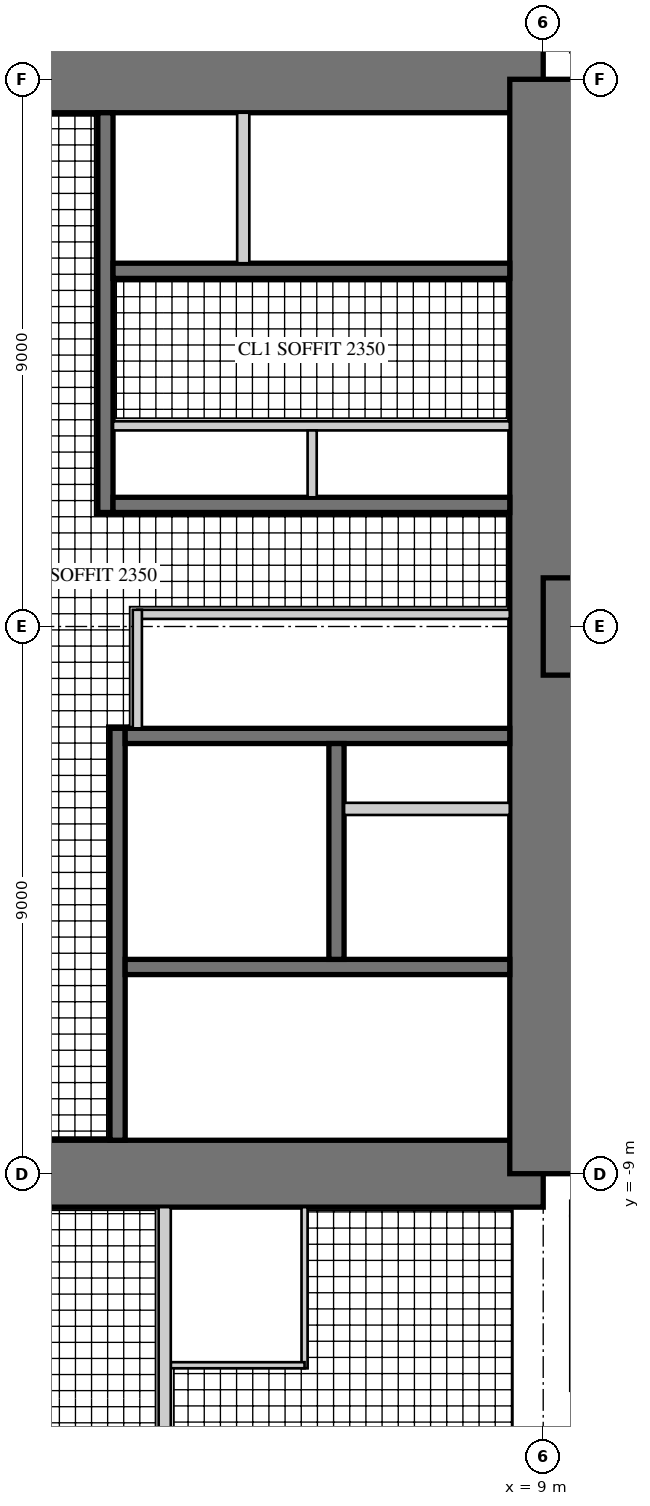
"""IFC4 building model, lengths in metres.
Left out: names, types, materials, properties, quantities, classifications, styles, units other than length and angle.
Written with IfcOpenShell. Run it as: python <this file> out.ifc"""

import sys

from ifc_helpers import new_model, si_unit, direction, frame, frame_2d, origin, place, context, subcontext, project, spatial, rectangle, extrude, element, fill, save


model = new_model("IFC4")
c1 = context("Model", 3, precision=1e-05, world=origin(), true_north=direction((0.0, 1.0)))
c2 = subcontext(c1, "Body", "Model", "MODEL_VIEW")
j1 = project(units=[si_unit("LENGTHUNIT", "METRE"), si_unit("PLANEANGLEUNIT", "RADIAN")], contexts=[c1])
p1 = place(None, origin())
s1 = spatial("IfcSite", under=j1, at=p1, CompositionType="ELEMENT")
p2 = place(p1, origin())
s2 = spatial("IfcBuilding", under=s1, at=p2, CompositionType="ELEMENT")
p3 = place(p2, frame((0.0, 0.0, 172.9)))
s3 = spatial("IfcBuildingStorey", under=s2, at=p3, CompositionType="ELEMENT", Elevation=172.9)
p4 = place(p3, frame((9.0, 9.0, 0.0), z_axis=(0.0, 0.0, 1.0), x_axis=(-1.0, 0.0, 0.0)))
e1 = element("IfcWall", 1, at=p4, inside=s3, PredefinedType="SHEAR", context=c2, shape_type="SweptSolid", body=[
    extrude(rectangle(XDim=18.0, YDim=1.1, at=frame_2d((9.0, 0.0))), origin(), (0.0, 0.0, 1.0), 3.4),
])
p5 = place(p4, frame((9.8, 0.0, 0.0)))
e2 = element("IfcOpeningElement", 2, at=p5, cuts=e1, PredefinedType="OPENING", context=c2, shape_type="SweptSolid", body=[
    extrude(rectangle(XDim=1.0, YDim=2.4, at=frame_2d((0.5, 1.2))), frame((0.0, 0.56, 0.0), z_axis=(0.0, -1.0, 0.0), x_axis=(1.0, 0.0, 0.0)), (0.0, 0.0, 1.0), 1.12),
])
p6 = place(p3, frame((-9.0, -9.0, 0.0), z_axis=(0.0, 0.0, 1.0), x_axis=(1.0, 0.0, 0.0)))
e3 = element("IfcWall", 3, at=p6, inside=s3, PredefinedType="SHEAR", context=c2, shape_type="SweptSolid", body=[
    extrude(rectangle(XDim=18.0, YDim=1.1, at=frame_2d((9.0, 0.0))), origin(), (0.0, 0.0, 1.0), 3.4),
])
p7 = place(p6, frame((9.8, 0.0, 0.0)))
e4 = element("IfcOpeningElement", 4, at=p7, cuts=e3, PredefinedType="OPENING", context=c2, shape_type="SweptSolid", body=[
    extrude(rectangle(XDim=1.0, YDim=2.4, at=frame_2d((0.5, 1.2))), frame((0.0, 0.56, 0.0), z_axis=(0.0, -1.0, 0.0), x_axis=(1.0, 0.0, 0.0)), (0.0, 0.0, 1.0), 1.12),
])
p8 = place(p3, frame((9.0, -9.0, 0.0), z_axis=(0.0, 0.0, 1.0), x_axis=(0.0, 1.0, 0.0)))
e5 = element("IfcWall", 5, at=p8, inside=s3, PredefinedType="SHEAR", context=c2, shape_type="SweptSolid", body=[
    extrude(rectangle(XDim=18.0, YDim=1.1, at=frame_2d((9.0, 0.0))), origin(), (0.0, 0.0, 1.0), 3.4),
])
p9 = place(p8, frame((9.8, 0.0, 0.0)))
e6 = element("IfcOpeningElement", 6, at=p9, cuts=e5, PredefinedType="OPENING", context=c2, shape_type="SweptSolid", body=[
    extrude(rectangle(XDim=1.0, YDim=2.4, at=frame_2d((0.5, 1.2))), frame((0.0, 0.56, 0.0), z_axis=(0.0, -1.0, 0.0), x_axis=(1.0, 0.0, 0.0)), (0.0, 0.0, 1.0), 1.12),
])
p10 = place(p3, frame((1.8, 1.875, 0.0), z_axis=(0.0, 0.0, 1.0), x_axis=(0.0, 1.0, 0.0)))
e7 = element("IfcWall", 7, at=p10, inside=s3, PredefinedType="SHEAR", context=c2, shape_type="SweptSolid", body=[
    extrude(rectangle(XDim=6.575, YDim=0.25, at=frame_2d((3.288, 0.0))), origin(), (0.0, 0.0, 1.0), 3.4),
])
p11 = place(p10, frame((1.875, 0.0, 0.0)))
e8 = element("IfcOpeningElement", 8, at=p11, cuts=e7, PredefinedType="OPENING", context=c2, shape_type="SweptSolid", body=[
    extrude(rectangle(XDim=1.6, YDim=2.4, at=frame_2d((0.8, 1.2))), frame((0.0, 0.135, 0.0), z_axis=(0.0, -1.0, 0.0), x_axis=(1.0, 0.0, 0.0)), (0.0, 0.0, 1.0), 0.27),
])
p12 = place(p3, frame((1.925, 2.0, 0.0), z_axis=(0.0, 0.0, 1.0), x_axis=(1.0, 0.0, 0.0)))
e9 = element("IfcWall", 9, at=p12, inside=s3, PredefinedType="SHEAR", context=c2, shape_type="SweptSolid", body=[
    extrude(rectangle(XDim=6.525, YDim=0.25, at=frame_2d((3.262, 0.0))), origin(), (0.0, 0.0, 1.0), 3.4),
])
p13 = place(p3, frame((1.925, 5.85, 0.0), z_axis=(0.0, 0.0, 1.0), x_axis=(1.0, 0.0, 0.0)))
e10 = element("IfcWall", 10, at=p13, inside=s3, PredefinedType="SHEAR", context=c2, shape_type="SweptSolid", body=[
    extrude(rectangle(XDim=6.525, YDim=0.25, at=frame_2d((3.262, 0.0))), origin(), (0.0, 0.0, 1.0), 3.4),
])
p14 = place(p13, frame((0.521, 0.0, 0.0)))
e11 = element("IfcOpeningElement", 11, at=p14, cuts=e10, PredefinedType="OPENING", context=c2, shape_type="SweptSolid", body=[
    extrude(rectangle(XDim=1.0, YDim=2.1, at=frame_2d((0.5, 1.05))), frame((0.0, 0.135, 0.0), z_axis=(0.0, -1.0, 0.0), x_axis=(1.0, 0.0, 0.0)), (0.0, 0.0, 1.0), 0.27),
])
p15 = place(p13, frame((2.762, 0.0, 0.0)))
e12 = element("IfcOpeningElement", 12, at=p15, cuts=e10, PredefinedType="OPENING", context=c2, shape_type="SweptSolid", body=[
    extrude(rectangle(XDim=1.0, YDim=2.1, at=frame_2d((0.5, 1.05))), frame((0.0, 0.135, 0.0), z_axis=(0.0, -1.0, 0.0), x_axis=(1.0, 0.0, 0.0)), (0.0, 0.0, 1.0), 0.27),
])
p16 = place(p3, frame((1.925, 3.3, 0.0), z_axis=(0.0, 0.0, 1.0), x_axis=(1.0, 0.0, 0.0)))
e13 = element("IfcWall", 13, at=p16, inside=s3, PredefinedType="PARTITIONING", context=c2, shape_type="SweptSolid", body=[
    extrude(rectangle(XDim=6.525, YDim=0.15, at=frame_2d((3.262, 0.0))), origin(), (0.0, 0.0, 1.0), 3.4),
])
p17 = place(p16, frame((0.075, 0.0, 0.0)))
e14 = element("IfcOpeningElement", 14, at=p17, cuts=e13, PredefinedType="OPENING", context=c2, shape_type="SweptSolid", body=[
    extrude(rectangle(XDim=0.8, YDim=2.1, at=frame_2d((0.4, 1.05))), frame((0.0, 0.085, 0.0), z_axis=(0.0, -1.0, 0.0), x_axis=(1.0, 0.0, 0.0)), (0.0, 0.0, 1.0), 0.17),
])
p18 = place(p16, frame((3.675, 0.0, 0.0)))
e15 = element("IfcOpeningElement", 15, at=p18, cuts=e13, PredefinedType="OPENING", context=c2, shape_type="SweptSolid", body=[
    extrude(rectangle(XDim=0.8, YDim=2.1, at=frame_2d((0.4, 1.05))), frame((0.0, 0.085, 0.0), z_axis=(0.0, -1.0, 0.0), x_axis=(1.0, 0.0, 0.0)), (0.0, 0.0, 1.0), 0.17),
])
p19 = place(p3, frame((5.2, 2.125, 0.0), z_axis=(0.0, 0.0, 1.0), x_axis=(0.0, 1.0, 0.0)))
e16 = element("IfcWall", 16, at=p19, inside=s3, PredefinedType="PARTITIONING", context=c2, shape_type="SweptSolid", body=[
    extrude(rectangle(XDim=1.1, YDim=0.15, at=frame_2d((0.55, 0.0))), origin(), (0.0, 0.0, 1.0), 3.4),
])
p20 = place(p3, frame((4.067, 5.975, 0.0), z_axis=(0.0, 0.0, 1.0), x_axis=(0.0, 1.0, 0.0)))
e17 = element("IfcWall", 17, at=p20, inside=s3, PredefinedType="PARTITIONING", context=c2, shape_type="SweptSolid", body=[
    extrude(rectangle(XDim=2.475, YDim=0.2, at=frame_2d((1.237, 0.0))), origin(), (0.0, 0.0, 1.0), 3.4),
])
p21 = place(p3, frame((2.0, -1.675, 0.0), z_axis=(0.0, 0.0, 1.0), x_axis=(0.0, -1.0, 0.0)))
e18 = element("IfcWall", 18, at=p21, inside=s3, PredefinedType="SHEAR", context=c2, shape_type="SweptSolid", body=[
    extrude(rectangle(XDim=6.775, YDim=0.25, at=frame_2d((3.387, 0.0))), origin(), (0.0, 0.0, 1.0), 3.4),
])
p22 = place(p21, frame((0.725, 0.0, 0.0)))
e19 = element("IfcOpeningElement", 19, at=p22, cuts=e18, PredefinedType="OPENING", context=c2, shape_type="SweptSolid", body=[
    extrude(rectangle(XDim=1.0, YDim=2.1, at=frame_2d((0.5, 1.05))), frame((0.0, 0.135, 0.0), z_axis=(0.0, -1.0, 0.0), x_axis=(1.0, 0.0, 0.0)), (0.0, 0.0, 1.0), 0.27),
])
p23 = place(p3, frame((2.125, -1.8, 0.0), z_axis=(0.0, 0.0, 1.0), x_axis=(1.0, 0.0, 0.0)))
e20 = element("IfcWall", 20, at=p23, inside=s3, PredefinedType="SHEAR", context=c2, shape_type="SweptSolid", body=[
    extrude(rectangle(XDim=6.325, YDim=0.25, at=frame_2d((3.163, 0.0))), origin(), (0.0, 0.0, 1.0), 3.4),
])
p24 = place(p3, frame((2.125, -5.6, 0.0), z_axis=(0.0, 0.0, 1.0), x_axis=(1.0, 0.0, 0.0)))
e21 = element("IfcWall", 21, at=p24, inside=s3, PredefinedType="SHEAR", context=c2, shape_type="SweptSolid", body=[
    extrude(rectangle(XDim=6.325, YDim=0.25, at=frame_2d((3.163, 0.0))), origin(), (0.0, 0.0, 1.0), 3.4),
])
p25 = place(p24, frame((0.175, 0.0, 0.0)))
e22 = element("IfcOpeningElement", 22, at=p25, cuts=e21, PredefinedType="OPENING", context=c2, shape_type="SweptSolid", body=[
    extrude(rectangle(XDim=1.0, YDim=2.1, at=frame_2d((0.5, 1.05))), frame((0.0, 0.135, 0.0), z_axis=(0.0, -1.0, 0.0), x_axis=(1.0, 0.0, 0.0)), (0.0, 0.0, 1.0), 0.27),
])
p26 = place(p3, frame((5.6, -1.925, 0.0), z_axis=(0.0, 0.0, 1.0), x_axis=(0.0, -1.0, 0.0)))
e23 = element("IfcWall", 23, at=p26, inside=s3, PredefinedType="SHEAR", context=c2, shape_type="SweptSolid", body=[
    extrude(rectangle(XDim=3.55, YDim=0.25, at=frame_2d((1.775, 0.0))), origin(), (0.0, 0.0, 1.0), 3.4),
])
p27 = place(p26, frame((1.525, 0.0, 0.0)))
e24 = element("IfcOpeningElement", 24, at=p27, cuts=e23, PredefinedType="OPENING", context=c2, shape_type="SweptSolid", body=[
    extrude(rectangle(XDim=1.1, YDim=2.2, at=frame_2d((0.55, 1.1))), frame((0.0, 0.135, 0.0), z_axis=(0.0, -1.0, 0.0), x_axis=(1.0, 0.0, 0.0)), (0.0, 0.0, 1.0), 0.27),
])
p28 = place(p26, frame((0.075, 0.0, 0.0)))
e25 = element("IfcOpeningElement", 25, at=p28, cuts=e23, PredefinedType="OPENING", context=c2, shape_type="SweptSolid", body=[
    extrude(rectangle(XDim=0.8, YDim=2.1, at=frame_2d((0.4, 1.05))), frame((0.0, 0.135, 0.0), z_axis=(0.0, -1.0, 0.0), x_axis=(1.0, 0.0, 0.0)), (0.0, 0.0, 1.0), 0.27),
])
p29 = place(p3, frame((5.725, -3.0, 0.0), z_axis=(0.0, 0.0, 1.0), x_axis=(1.0, 0.0, 0.0)))
e26 = element("IfcWall", 26, at=p29, inside=s3, PredefinedType="PARTITIONING", context=c2, shape_type="SweptSolid", body=[
    extrude(rectangle(XDim=2.725, YDim=0.2, at=frame_2d((1.362, 0.0))), origin(), (0.0, 0.0, 1.0), 3.4),
])
p30 = place(p3, frame((9.0, 0.0, 0.0), z_axis=(0.0, 0.0, 1.0), x_axis=(1.0, 0.0, 0.0)))
e27 = element("IfcWall", 27, at=p30, inside=s3, PredefinedType="SHEAR", context=c2, shape_type="SweptSolid", body=[
    extrude(rectangle(XDim=9.0, YDim=1.6, at=frame_2d((4.5, 0.0))), origin(), (0.0, 0.0, 1.0), 3.4),
])
p31 = place(p30, frame((3.95, 0.0, 0.0)))
e28 = element("IfcOpeningElement", 28, at=p31, cuts=e27, PredefinedType="OPENING", context=c2, shape_type="SweptSolid", body=[
    extrude(rectangle(XDim=1.0, YDim=2.15, at=frame_2d((0.5, 1.075))), frame((0.0, 0.81, 0.0), z_axis=(0.0, -1.0, 0.0), x_axis=(1.0, 0.0, 0.0)), (0.0, 0.0, 1.0), 1.62),
])
p32 = place(p30, frame((7.0, 0.0, 0.0)))
e29 = element("IfcOpeningElement", 29, at=p32, cuts=e27, PredefinedType="OPENING", context=c2, shape_type="SweptSolid", body=[
    extrude(rectangle(XDim=1.0, YDim=2.2, at=frame_2d((0.5, 1.1))), frame((0.0, 0.81, 0.0), z_axis=(0.0, -1.0, 0.0), x_axis=(1.0, 0.0, 0.0)), (0.0, 0.0, 1.0), 1.62),
])
p33 = place(p3, frame((9.445, -9.57, 0.0), z_axis=(0.0, 0.0, 1.0), x_axis=(1.0, 0.0, 0.0)))
e30 = element("IfcWall", 30, at=p33, inside=s3, PredefinedType="SOLIDWALL", context=c2, shape_type="SweptSolid", body=[
    extrude(rectangle(XDim=3.125, YDim=0.25, at=frame_2d((1.562, 0.0))), origin(), (0.0, 0.0, 1.0), 3.22),
])
p34 = place(p33, frame((0.6, 0.0, 0.0)))
e31 = element("IfcOpeningElement", 31, at=p34, cuts=e30, PredefinedType="OPENING", context=c2, shape_type="SweptSolid", body=[
    extrude(rectangle(XDim=1.0, YDim=2.2, at=frame_2d((0.5, 1.1))), frame((0.0, 0.135, 0.0), z_axis=(0.0, -1.0, 0.0), x_axis=(1.0, 0.0, 0.0)), (0.0, 0.0, 1.0), 0.27),
])
p35 = place(p3, frame((9.57, 9.445, 0.0), z_axis=(0.0, 0.0, 1.0), x_axis=(0.0, 1.0, 0.0)))
e32 = element("IfcWall", 32, at=p35, inside=s3, PredefinedType="SOLIDWALL", context=c2, shape_type="SweptSolid", body=[
    extrude(rectangle(XDim=3.125, YDim=0.25, at=frame_2d((1.562, 0.0))), origin(), (0.0, 0.0, 1.0), 3.22),
])
p36 = place(p35, frame((0.6, 0.0, 0.0)))
e33 = element("IfcOpeningElement", 33, at=p36, cuts=e32, PredefinedType="OPENING", context=c2, shape_type="SweptSolid", body=[
    extrude(rectangle(XDim=1.0, YDim=2.2, at=frame_2d((0.5, 1.1))), frame((0.0, 0.135, 0.0), z_axis=(0.0, -1.0, 0.0), x_axis=(1.0, 0.0, 0.0)), (0.0, 0.0, 1.0), 0.27),
])
p37 = place(p3, frame((9.57, -12.57, 0.0), z_axis=(0.0, 0.0, 1.0), x_axis=(0.0, 1.0, 0.0)))
e34 = element("IfcWall", 34, at=p37, inside=s3, PredefinedType="SOLIDWALL", context=c2, shape_type="SweptSolid", body=[
    extrude(rectangle(XDim=2.875, YDim=0.25, at=frame_2d((1.438, 0.0))), origin(), (0.0, 0.0, 1.0), 3.22),
])
p38 = place(p37, frame((0.6, 0.0, 0.0)))
e35 = element("IfcOpeningElement", 35, at=p38, cuts=e34, PredefinedType="OPENING", context=c2, shape_type="SweptSolid", body=[
    extrude(rectangle(XDim=1.0, YDim=2.2, at=frame_2d((0.5, 1.1))), frame((0.0, 0.135, 0.0), z_axis=(0.0, -1.0, 0.0), x_axis=(1.0, 0.0, 0.0)), (0.0, 0.0, 1.0), 0.27),
])
p39 = place(p3, frame((2.325, 0.2, 0.0), z_axis=(0.0, 0.0, 1.0), x_axis=(1.0, 0.0, 0.0)))
e36 = element("IfcWall", 36, at=p39, inside=s3, PredefinedType="PARTITIONING", context=c2, shape_type="SweptSolid", body=[
    extrude(rectangle(XDim=6.125, YDim=0.15, at=frame_2d((3.062, 0.0))), origin(), (0.0, 0.0, 1.0), 3.22),
])
p40 = place(p39, frame((0.4, 0.0, 0.0)))
e37 = element("IfcOpeningElement", 37, at=p40, cuts=e36, PredefinedType="OPENING", context=c2, shape_type="SweptSolid", body=[
    extrude(rectangle(XDim=1.0, YDim=2.1, at=frame_2d((0.5, 1.05))), frame((0.0, 0.085, 0.0), z_axis=(0.0, -1.0, 0.0), x_axis=(1.0, 0.0, 0.0)), (0.0, 0.0, 1.0), 0.17),
])
p41 = place(p3, frame((2.325, -1.675, 0.0), z_axis=(0.0, 0.0, 1.0), x_axis=(0.0, 1.0, 0.0)))
e38 = element("IfcWall", 38, at=p41, inside=s3, PredefinedType="PARTITIONING", context=c2, shape_type="SweptSolid", body=[
    extrude(rectangle(XDim=1.95, YDim=0.15, at=frame_2d((0.975, 0.0))), origin(), (0.0, 0.0, 1.0), 3.22),
])
p42 = place(p3, frame((5.075, -9.55, 0.0), z_axis=(0.0, 0.0, 1.0), x_axis=(0.0, -1.0, 0.0)))
e39 = element("IfcWall", 39, at=p42, inside=s3, PredefinedType="PARTITIONING", context=c2, shape_type="SweptSolid", body=[
    extrude(rectangle(XDim=2.65, YDim=0.1, at=frame_2d((1.325, 0.0))), origin(), (0.0, 0.0, 1.0), 3.22),
])
p43 = place(p3, frame((2.875, -12.15, 0.0), z_axis=(0.0, 0.0, 1.0), x_axis=(1.0, 0.0, 0.0)))
e40 = element("IfcWall", 40, at=p43, inside=s3, PredefinedType="PARTITIONING", context=c2, shape_type="SweptSolid", body=[
    extrude(rectangle(XDim=2.2, YDim=0.1, at=frame_2d((1.1, 0.0))), origin(), (0.0, 0.0, 1.0), 3.22),
])
p44 = place(p43, frame((0.55, 0.0, 0.0)))
e41 = element("IfcOpeningElement", 41, at=p44, cuts=e40, PredefinedType="OPENING", context=c2, shape_type="SweptSolid", body=[
    extrude(rectangle(XDim=0.9, YDim=2.1, at=frame_2d((0.45, 1.05))), frame((0.0, 0.06, 0.0), z_axis=(0.0, -1.0, 0.0), x_axis=(1.0, 0.0, 0.0)), (0.0, 0.0, 1.0), 0.12),
])
p45 = place(p3, frame((2.775, -9.55, 0.0), z_axis=(0.0, 0.0, 1.0), x_axis=(0.0, -1.0, 0.0)))
e42 = element("IfcWall", 42, at=p45, inside=s3, PredefinedType="SOLIDWALL", context=c2, shape_type="SweptSolid", body=[
    extrude(rectangle(XDim=11.45, YDim=0.2, at=frame_2d((5.725, 0.0))), origin(), (0.0, 0.0, 1.0), 3.22),
])
p46 = place(p45, frame((3.4, 0.0, 0.0)))
e43 = element("IfcOpeningElement", 43, at=p46, cuts=e42, PredefinedType="OPENING", context=c2, shape_type="SweptSolid", body=[
    extrude(rectangle(XDim=1.0, YDim=2.15, at=frame_2d((0.5, 1.075))), frame((0.0, 0.11, 0.0), z_axis=(0.0, -1.0, 0.0), x_axis=(1.0, 0.0, 0.0)), (0.0, 0.0, 1.0), 0.22),
])
p47 = place(p45, frame((6.05, 0.0, 0.0)))
e44 = element("IfcOpeningElement", 44, at=p47, cuts=e42, PredefinedType="OPENING", context=c2, shape_type="SweptSolid", body=[
    extrude(rectangle(XDim=1.0, YDim=2.15, at=frame_2d((0.5, 1.075))), frame((0.0, 0.11, 0.0), z_axis=(0.0, -1.0, 0.0), x_axis=(1.0, 0.0, 0.0)), (0.0, 0.0, 1.0), 0.22),
])
p48 = place(p40, frame((1.0, 0.0, 0.0), z_axis=(0.0, 0.0, 1.0), x_axis=(-1.0, 0.0, 0.0)))
e45 = element("IfcDoor", 45, at=p48, inside=s3, OperationType="SINGLE_SWING_RIGHT", PredefinedType="DOOR", context=c2, shape_type="SweptSolid", body=[
    extrude(rectangle(XDim=1.0, YDim=2.1, at=frame_2d((0.5, 1.05))), frame((0.0, 0.025, 0.0), z_axis=(0.0, -1.0, 0.0), x_axis=(1.0, 0.0, 0.0)), (0.0, 0.0, 1.0), 0.05),
])
fill(e37, e45)
p49 = place(p44, origin())
e46 = element("IfcDoor", 46, at=p49, inside=s3, OperationType="SINGLE_SWING_LEFT", PredefinedType="DOOR", context=c2, shape_type="SweptSolid", body=[
    extrude(rectangle(XDim=0.9, YDim=2.1, at=frame_2d((0.45, 1.05))), frame((0.0, 0.025, 0.0), z_axis=(0.0, -1.0, 0.0), x_axis=(1.0, 0.0, 0.0)), (0.0, 0.0, 1.0), 0.05),
])
fill(e41, e46)
p50 = place(p46, origin())
e47 = element("IfcDoor", 47, at=p50, inside=s3, OperationType="SINGLE_SWING_LEFT", PredefinedType="DOOR", context=c2, shape_type="SweptSolid", body=[
    extrude(rectangle(XDim=1.0, YDim=2.15, at=frame_2d((0.5, 1.075))), frame((0.0, 0.025, 0.0), z_axis=(0.0, -1.0, 0.0), x_axis=(1.0, 0.0, 0.0)), (0.0, 0.0, 1.0), 0.05),
])
fill(e43, e47)
p51 = place(p7, origin())
e48 = element("IfcDoor", 48, at=p51, inside=s3, OperationType="SINGLE_SWING_RIGHT", PredefinedType="DOOR", context=c2, shape_type="SweptSolid", body=[
    extrude(rectangle(XDim=1.0, YDim=2.4, at=frame_2d((0.5, 1.2))), frame((0.0, 0.055, 0.0), z_axis=(0.0, -1.0, 0.0), x_axis=(1.0, 0.0, 0.0)), (0.0, 0.0, 1.0), 0.05),
])
fill(e4, e48)
p52 = place(p9, origin())
e49 = element("IfcDoor", 49, at=p52, inside=s3, OperationType="SINGLE_SWING_RIGHT", PredefinedType="DOOR", context=c2, shape_type="SweptSolid", body=[
    extrude(rectangle(XDim=1.0, YDim=2.4, at=frame_2d((0.5, 1.2))), frame((0.0, 0.055, 0.0), z_axis=(0.0, -1.0, 0.0), x_axis=(1.0, 0.0, 0.0)), (0.0, 0.0, 1.0), 0.05),
])
fill(e6, e49)
p53 = place(p11, frame((1.6, 0.0, 0.0), z_axis=(0.0, 0.0, 1.0), x_axis=(-1.0, 0.0, 0.0)))
e50 = element("IfcDoor", 50, at=p53, inside=s3, OperationType="DOUBLE_DOOR_SINGLE_SWING", PredefinedType="DOOR", context=c2, shape_type="SweptSolid", body=[
    extrude(rectangle(XDim=1.6, YDim=2.4, at=frame_2d((0.8, 1.2))), frame((0.0, 0.025, 0.0), z_axis=(0.0, -1.0, 0.0), x_axis=(1.0, 0.0, 0.0)), (0.0, 0.0, 1.0), 0.05),
])
fill(e8, e50)
p54 = place(p17, frame((0.8, 0.0, 0.0), z_axis=(0.0, 0.0, 1.0), x_axis=(-1.0, 0.0, 0.0)))
e51 = element("IfcDoor", 51, at=p54, inside=s3, OperationType="SINGLE_SWING_RIGHT", PredefinedType="DOOR", context=c2, shape_type="SweptSolid", body=[
    extrude(rectangle(XDim=0.8, YDim=2.1, at=frame_2d((0.4, 1.05))), frame((0.0, 0.025, 0.0), z_axis=(0.0, -1.0, 0.0), x_axis=(1.0, 0.0, 0.0)), (0.0, 0.0, 1.0), 0.05),
])
fill(e14, e51)
p55 = place(p18, frame((0.8, 0.0, 0.0), z_axis=(0.0, 0.0, 1.0), x_axis=(-1.0, 0.0, 0.0)))
e52 = element("IfcDoor", 52, at=p55, inside=s3, OperationType="SINGLE_SWING_RIGHT", PredefinedType="DOOR", context=c2, shape_type="SweptSolid", body=[
    extrude(rectangle(XDim=0.8, YDim=2.1, at=frame_2d((0.4, 1.05))), frame((0.0, 0.025, 0.0), z_axis=(0.0, -1.0, 0.0), x_axis=(1.0, 0.0, 0.0)), (0.0, 0.0, 1.0), 0.05),
])
fill(e15, e52)
p56 = place(p22, origin())
e53 = element("IfcDoor", 53, at=p56, inside=s3, OperationType="SINGLE_SWING_LEFT", PredefinedType="DOOR", context=c2, shape_type="SweptSolid", body=[
    extrude(rectangle(XDim=1.0, YDim=2.1, at=frame_2d((0.5, 1.05))), frame((0.0, 0.025, 0.0), z_axis=(0.0, -1.0, 0.0), x_axis=(1.0, 0.0, 0.0)), (0.0, 0.0, 1.0), 0.05),
])
fill(e19, e53)
p57 = place(p25, frame((1.0, 0.0, 0.0), z_axis=(0.0, 0.0, 1.0), x_axis=(-1.0, 0.0, 0.0)))
e54 = element("IfcDoor", 54, at=p57, inside=s3, OperationType="SINGLE_SWING_RIGHT", PredefinedType="DOOR", context=c2, shape_type="SweptSolid", body=[
    extrude(rectangle(XDim=1.0, YDim=2.1, at=frame_2d((0.5, 1.05))), frame((0.0, 0.025, 0.0), z_axis=(0.0, -1.0, 0.0), x_axis=(1.0, 0.0, 0.0)), (0.0, 0.0, 1.0), 0.05),
])
fill(e22, e54)
p58 = place(p27, origin())
e55 = element("IfcDoor", 55, at=p58, inside=s3, OperationType="DOUBLE_DOOR_SLIDING", PredefinedType="DOOR", context=c2, shape_type="SweptSolid", body=[
    extrude(rectangle(XDim=1.1, YDim=2.2, at=frame_2d((0.55, 1.1))), frame((0.0, 0.025, 0.0), z_axis=(0.0, -1.0, 0.0), x_axis=(1.0, 0.0, 0.0)), (0.0, 0.0, 1.0), 0.05),
])
fill(e24, e55)
p59 = place(p28, origin())
e56 = element("IfcDoor", 56, at=p59, inside=s3, OperationType="SINGLE_SWING_LEFT", PredefinedType="DOOR", context=c2, shape_type="SweptSolid", body=[
    extrude(rectangle(XDim=0.8, YDim=2.1, at=frame_2d((0.4, 1.05))), frame((0.0, 0.025, 0.0), z_axis=(0.0, -1.0, 0.0), x_axis=(1.0, 0.0, 0.0)), (0.0, 0.0, 1.0), 0.05),
])
fill(e25, e56)
p60 = place(p14, origin())
e57 = element("IfcDoor", 57, at=p60, inside=s3, OperationType="SINGLE_SWING_LEFT", PredefinedType="DOOR", context=c2, shape_type="SweptSolid", body=[
    extrude(rectangle(XDim=1.0, YDim=2.1, at=frame_2d((0.5, 1.05))), frame((0.0, 0.025, 0.0), z_axis=(0.0, -1.0, 0.0), x_axis=(1.0, 0.0, 0.0)), (0.0, 0.0, 1.0), 0.05),
])
fill(e11, e57)
p61 = place(p15, origin())
e58 = element("IfcDoor", 58, at=p61, inside=s3, OperationType="SINGLE_SWING_LEFT", PredefinedType="DOOR", context=c2, shape_type="SweptSolid", body=[
    extrude(rectangle(XDim=1.0, YDim=2.1, at=frame_2d((0.5, 1.05))), frame((0.0, 0.025, 0.0), z_axis=(0.0, -1.0, 0.0), x_axis=(1.0, 0.0, 0.0)), (0.0, 0.0, 1.0), 0.05),
])
fill(e12, e58)
save(model, sys.argv[1])
